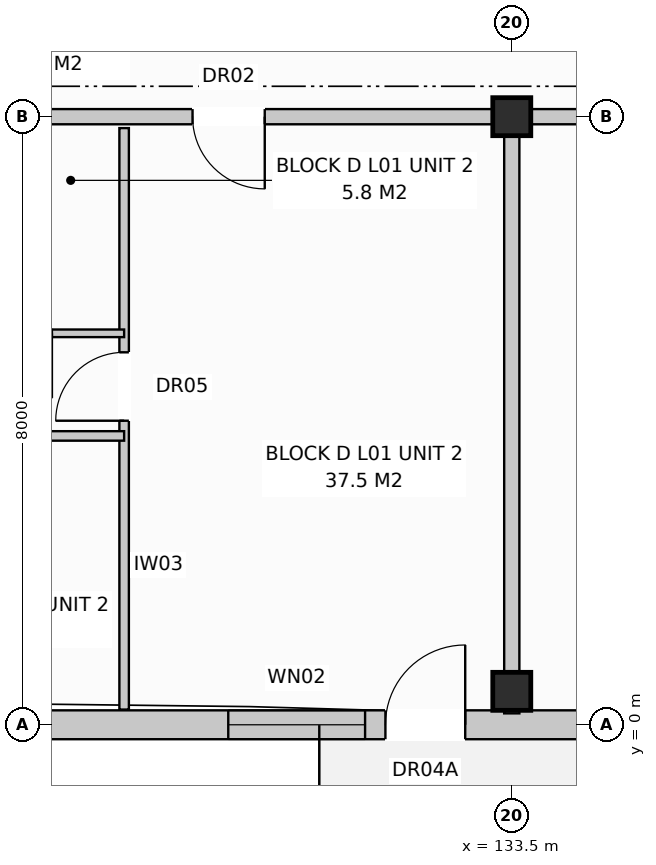
"""IFC4 building model, lengths in metres.
Left out: names, types, materials, properties, quantities, classifications, styles, units other than length and angle.
Written with IfcOpenShell. Run it as: python <this file> out.ifc"""

import sys

from ifc_helpers import new_model, si_unit, direction, frame, frame_2d, origin, origin_with_axes, origin_2d, place, context, subcontext, project, spatial, rectangle, extrude, element, fill, save


model = new_model("IFC4")
c1 = context("Model", 3, precision=1e-05, world=origin(), true_north=direction((0.0, 1.0)))
c2 = subcontext(c1, "Body", "Model", "MODEL_VIEW")
j1 = project(units=[si_unit("LENGTHUNIT", "METRE"), si_unit("PLANEANGLEUNIT", "RADIAN")], contexts=[c1])
p1 = place(None, origin())
s1 = spatial("IfcSite", under=j1, at=p1, CompositionType="ELEMENT")
p2 = place(p1, origin())
s2 = spatial("IfcBuilding", under=s1, at=p2, CompositionType="ELEMENT")
p3 = place(p2, frame((0.0, 0.0, 4.4)))
s3 = spatial("IfcBuildingStorey", under=s2, at=p3, CompositionType="ELEMENT", Elevation=4.4)
for number, where, z_axis, x_axis in (
    (1, (133.5, 0.44, 0.0), (0.0, 0.0, 1.0), (1.0, 0.0, 0.0)),
    (2, (133.5, 8.0, 0.0), (0.0, 0.0, 1.0), (1.0, 0.0, 0.0)),
):
    element("IfcColumn", number, at=place(p3, frame(where, z_axis=z_axis, x_axis=x_axis)), inside=s3, PredefinedType="COLUMN", context=c2, shape_type="SweptSolid", body=[
        extrude(rectangle(XDim=0.5, YDim=0.5, at=origin_2d()), origin(), (0.0, 0.0, 1.0), 3.6),
    ])
p4 = place(p3, frame((112.98, 0.0, 0.0), z_axis=(0.0, 0.0, 1.0), x_axis=(1.0, 0.0, 0.0)))
e3 = element("IfcWall", 3, at=p4, inside=s3, PredefinedType="STANDARD", context=c2, shape_type="SweptSolid", body=[
    extrude(rectangle(XDim=54.84, YDim=0.38, at=frame_2d((27.42, 0.0))), origin(), (0.0, 0.0, 1.0), 3.33),
])
p5 = place(p4, frame((5.04, 0.0, 0.0)))
e4 = element("IfcOpeningElement", 4, at=p5, cuts=e3, PredefinedType="OPENING", context=c2, shape_type="SweptSolid", body=[
    extrude(rectangle(XDim=1.05, YDim=2.12, at=frame_2d((0.525, 1.06))), frame((0.0, 0.202, 0.0), z_axis=(0.0, -1.0, 0.0), x_axis=(1.0, 0.0, 0.0)), (0.0, 0.0, 1.0), 0.404),
])
p6 = place(p4, frame((18.857, 0.0, 0.0)))
e5 = element("IfcOpeningElement", 5, at=p6, cuts=e3, PredefinedType="OPENING", context=c2, shape_type="SweptSolid", body=[
    extrude(rectangle(XDim=1.05, YDim=2.12, at=frame_2d((0.525, 1.06))), frame((0.0, 0.202, 0.0), z_axis=(0.0, -1.0, 0.0), x_axis=(1.0, 0.0, 0.0)), (0.0, 0.0, 1.0), 0.404),
])
p7 = place(p4, frame((32.657, 0.0, 0.0)))
e6 = element("IfcOpeningElement", 6, at=p7, cuts=e3, PredefinedType="OPENING", context=c2, shape_type="SweptSolid", body=[
    extrude(rectangle(XDim=1.05, YDim=2.12, at=frame_2d((0.525, 1.06))), frame((0.0, 0.202, 0.0), z_axis=(0.0, -1.0, 0.0), x_axis=(1.0, 0.0, 0.0)), (0.0, 0.0, 1.0), 0.404),
])
p8 = place(p4, frame((48.74, 0.0, 0.0)))
e7 = element("IfcOpeningElement", 7, at=p8, cuts=e3, PredefinedType="OPENING", context=c2, shape_type="SweptSolid", body=[
    extrude(rectangle(XDim=1.05, YDim=2.12, at=frame_2d((0.525, 1.06))), frame((0.0, 0.202, 0.0), z_axis=(0.0, -1.0, 0.0), x_axis=(1.0, 0.0, 0.0)), (0.0, 0.0, 1.0), 0.404),
])
p9 = place(p4, frame((0.89, 0.0, 0.8)))
e8 = element("IfcOpeningElement", 8, at=p9, cuts=e3, PredefinedType="OPENING", context=c2, shape_type="SweptSolid", body=[
    extrude(rectangle(XDim=1.8, YDim=1.7, at=frame_2d((0.9, 0.85))), frame((0.0, 0.202, 0.0), z_axis=(0.0, -1.0, 0.0), x_axis=(1.0, 0.0, 0.0)), (0.0, 0.0, 1.0), 0.404),
])
p10 = place(p4, frame((7.94, 0.0, 0.8)))
e9 = element("IfcOpeningElement", 9, at=p10, cuts=e3, PredefinedType="OPENING", context=c2, shape_type="SweptSolid", body=[
    extrude(rectangle(XDim=1.9, YDim=1.85, at=frame_2d((0.95, 0.925))), frame((0.0, 0.202, 0.0), z_axis=(0.0, -1.0, 0.0), x_axis=(1.0, 0.0, 0.0)), (0.0, 0.0, 1.0), 0.404),
])
p11 = place(p4, frame((11.215, 0.0, 0.8)))
e10 = element("IfcOpeningElement", 10, at=p11, cuts=e3, PredefinedType="OPENING", context=c2, shape_type="SweptSolid", body=[
    extrude(rectangle(XDim=1.95, YDim=1.65, at=frame_2d((0.975, 0.825))), frame((0.0, 0.202, 0.0), z_axis=(0.0, -1.0, 0.0), x_axis=(1.0, 0.0, 0.0)), (0.0, 0.0, 1.0), 0.404),
])
p12 = place(p4, frame((16.79, 0.0, 0.8)))
e11 = element("IfcOpeningElement", 11, at=p12, cuts=e3, PredefinedType="OPENING", context=c2, shape_type="SweptSolid", body=[
    extrude(rectangle(XDim=1.8, YDim=1.7, at=frame_2d((0.9, 0.85))), frame((0.0, 0.202, 0.0), z_axis=(0.0, -1.0, 0.0), x_axis=(1.0, 0.0, 0.0)), (0.0, 0.0, 1.0), 0.404),
])
p13 = place(p4, frame((22.24, 0.0, 0.8)))
e12 = element("IfcOpeningElement", 12, at=p13, cuts=e3, PredefinedType="OPENING", context=c2, shape_type="SweptSolid", body=[
    extrude(rectangle(XDim=1.9, YDim=1.85, at=frame_2d((0.95, 0.925))), frame((0.0, 0.202, 0.0), z_axis=(0.0, -1.0, 0.0), x_axis=(1.0, 0.0, 0.0)), (0.0, 0.0, 1.0), 0.404),
])
p14 = place(p4, frame((27.873, 0.0, 0.8)))
e13 = element("IfcOpeningElement", 13, at=p14, cuts=e3, PredefinedType="OPENING", context=c2, shape_type="SweptSolid", body=[
    extrude(rectangle(XDim=1.95, YDim=1.65, at=frame_2d((0.975, 0.825))), frame((0.0, 0.202, 0.0), z_axis=(0.0, -1.0, 0.0), x_axis=(1.0, 0.0, 0.0)), (0.0, 0.0, 1.0), 0.404),
])
p15 = place(p4, frame((30.59, 0.0, 0.8)))
e14 = element("IfcOpeningElement", 14, at=p15, cuts=e3, PredefinedType="OPENING", context=c2, shape_type="SweptSolid", body=[
    extrude(rectangle(XDim=1.8, YDim=1.7, at=frame_2d((0.9, 0.85))), frame((0.0, 0.202, 0.0), z_axis=(0.0, -1.0, 0.0), x_axis=(1.0, 0.0, 0.0)), (0.0, 0.0, 1.0), 0.404),
])
p16 = place(p4, frame((36.54, 0.0, 0.8)))
e15 = element("IfcOpeningElement", 15, at=p16, cuts=e3, PredefinedType="OPENING", context=c2, shape_type="SweptSolid", body=[
    extrude(rectangle(XDim=1.9, YDim=1.85, at=frame_2d((0.95, 0.925))), frame((0.0, 0.202, 0.0), z_axis=(0.0, -1.0, 0.0), x_axis=(1.0, 0.0, 0.0)), (0.0, 0.0, 1.0), 0.404),
])
p17 = place(p4, frame((42.215, 0.0, 0.8)))
e16 = element("IfcOpeningElement", 16, at=p17, cuts=e3, PredefinedType="OPENING", context=c2, shape_type="SweptSolid", body=[
    extrude(rectangle(XDim=1.95, YDim=1.65, at=frame_2d((0.975, 0.825))), frame((0.0, 0.202, 0.0), z_axis=(0.0, -1.0, 0.0), x_axis=(1.0, 0.0, 0.0)), (0.0, 0.0, 1.0), 0.404),
])
p18 = place(p4, frame((46.04, 0.0, 0.85)))
e17 = element("IfcOpeningElement", 17, at=p18, cuts=e3, PredefinedType="OPENING", context=c2, shape_type="SweptSolid", body=[
    extrude(rectangle(XDim=1.6, YDim=1.85, at=frame_2d((0.8, 0.925))), frame((0.0, 0.202, 0.0), z_axis=(0.0, -1.0, 0.0), x_axis=(1.0, 0.0, 0.0)), (0.0, 0.0, 1.0), 0.404),
])
p19 = place(p4, frame((52.04, 0.0, 0.8)))
e18 = element("IfcOpeningElement", 18, at=p19, cuts=e3, PredefinedType="OPENING", context=c2, shape_type="SweptSolid", body=[
    extrude(rectangle(XDim=1.9, YDim=1.85, at=frame_2d((0.95, 0.925))), frame((0.0, 0.202, 0.0), z_axis=(0.0, -1.0, 0.0), x_axis=(1.0, 0.0, 0.0)), (0.0, 0.0, 1.0), 0.404),
])
p20 = place(p3, frame((133.5, 7.85, 0.0), z_axis=(0.0, 0.0, 1.0), x_axis=(0.0, -1.0, 0.0)))
e19 = element("IfcWall", 19, at=p20, inside=s3, PredefinedType="PARTITIONING", context=c2, shape_type="SweptSolid", body=[
    extrude(rectangle(XDim=7.7, YDim=0.2, at=frame_2d((3.85, 0.0))), origin(), (0.0, 0.0, 1.0), 3.33),
])
p21 = place(p3, frame((119.7, 8.0, 0.0), z_axis=(0.0, 0.0, 1.0), x_axis=(1.0, 0.0, 0.0)))
e20 = element("IfcWall", 20, at=p21, inside=s3, PredefinedType="PARTITIONING", context=c2, shape_type="SweptSolid", body=[
    extrude(rectangle(XDim=13.8, YDim=0.2, at=frame_2d((6.9, 0.0))), origin(), (0.0, 0.0, 1.0), 2.77),
])
p22 = place(p21, frame((9.6, 0.0, 0.0)))
e21 = element("IfcOpeningElement", 21, at=p22, cuts=e20, PredefinedType="OPENING", context=c2, shape_type="SweptSolid", body=[
    extrude(rectangle(XDim=0.95, YDim=2.15, at=frame_2d((0.475, 1.075))), frame((0.0, 0.112, 0.0), z_axis=(0.0, -1.0, 0.0), x_axis=(1.0, 0.0, 0.0)), (0.0, 0.0, 1.0), 0.224),
])
p23 = place(p3, frame((128.4, 7.85, 0.0), z_axis=(0.0, 0.0, 1.0), x_axis=(0.0, -1.0, 0.0)))
e22 = element("IfcWall", 22, at=p23, inside=s3, PredefinedType="PARTITIONING", context=c2, shape_type="SweptSolid", body=[
    extrude(rectangle(XDim=7.65, YDim=0.125, at=frame_2d((3.825, 0.0))), origin(), (0.0, 0.0, 1.0), 3.33),
])
p24 = place(p23, frame((2.95, 0.0, 0.0)))
e23 = element("IfcOpeningElement", 23, at=p24, cuts=e22, PredefinedType="OPENING", context=c2, shape_type="SweptSolid", body=[
    extrude(rectangle(XDim=0.9, YDim=2.1, at=frame_2d((0.45, 1.05))), frame((0.0, 0.074, 0.0), z_axis=(0.0, -1.0, 0.0), x_axis=(1.0, 0.0, 0.0)), (0.0, 0.0, 1.0), 0.149),
])
p25 = place(p3, frame((119.8, 5.15, 0.0), z_axis=(0.0, 0.0, 1.0), x_axis=(1.0, 0.0, 0.0)))
e24 = element("IfcWall", 24, at=p25, inside=s3, PredefinedType="PARTITIONING", context=c2, shape_type="SweptSolid", body=[
    extrude(rectangle(XDim=8.6, YDim=0.1, at=frame_2d((4.3, 0.0))), origin(), (0.0, 0.0, 1.0), 3.33),
])
p26 = place(p25, frame((1.4, 0.0, 0.0)))
e25 = element("IfcOpeningElement", 25, at=p26, cuts=e24, PredefinedType="OPENING", context=c2, shape_type="SweptSolid", body=[
    extrude(rectangle(XDim=0.85, YDim=2.05, at=frame_2d((0.425, 1.025))), frame((0.0, 0.062, 0.0), z_axis=(0.0, -1.0, 0.0), x_axis=(1.0, 0.0, 0.0)), (0.0, 0.0, 1.0), 0.124),
])
p27 = place(p25, frame((4.65, 0.0, 0.0)))
e26 = element("IfcOpeningElement", 26, at=p27, cuts=e24, PredefinedType="OPENING", context=c2, shape_type="SweptSolid", body=[
    extrude(rectangle(XDim=0.85, YDim=2.05, at=frame_2d((0.425, 1.025))), frame((0.0, 0.062, 0.0), z_axis=(0.0, -1.0, 0.0), x_axis=(1.0, 0.0, 0.0)), (0.0, 0.0, 1.0), 0.124),
])
p28 = place(p25, frame((6.8, 0.0, 0.0)))
e27 = element("IfcOpeningElement", 27, at=p28, cuts=e24, PredefinedType="OPENING", context=c2, shape_type="SweptSolid", body=[
    extrude(rectangle(XDim=0.85, YDim=2.1, at=frame_2d((0.425, 1.05))), frame((0.0, 0.062, 0.0), z_axis=(0.0, -1.0, 0.0), x_axis=(1.0, 0.0, 0.0)), (0.0, 0.0, 1.0), 0.124),
])
p29 = place(p3, frame((123.9, 3.8, 0.0), z_axis=(0.0, 0.0, 1.0), x_axis=(1.0, 0.0, 0.0)))
e28 = element("IfcWall", 28, at=p29, inside=s3, PredefinedType="PARTITIONING", context=c2, shape_type="SweptSolid", body=[
    extrude(rectangle(XDim=4.5, YDim=0.125, at=frame_2d((2.25, 0.0))), origin(), (0.0, 0.0, 1.0), 3.33),
])
p30 = place(p29, frame((1.6, 0.0, 0.0)))
e29 = element("IfcOpeningElement", 29, at=p30, cuts=e28, PredefinedType="OPENING", context=c2, shape_type="SweptSolid", body=[
    extrude(rectangle(XDim=0.9, YDim=2.1, at=frame_2d((0.45, 1.05))), frame((0.0, 0.074, 0.0), z_axis=(0.0, -1.0, 0.0), x_axis=(1.0, 0.0, 0.0)), (0.0, 0.0, 1.0), 0.149),
])
p31 = place(p3, frame((133.5, 8.0, 0.0), z_axis=(0.0, 0.0, 1.0), x_axis=(1.0, 0.0, 0.0)))
e30 = element("IfcWall", 30, at=p31, inside=s3, PredefinedType="PARTITIONING", context=c2, shape_type="SweptSolid", body=[
    extrude(rectangle(XDim=13.8, YDim=0.2, at=frame_2d((6.9, 0.0))), origin(), (0.0, 0.0, 1.0), 2.77),
])
p32 = place(p31, frame((2.4, 0.0, 0.0)))
e31 = element("IfcOpeningElement", 31, at=p32, cuts=e30, PredefinedType="OPENING", context=c2, shape_type="SweptSolid", body=[
    extrude(rectangle(XDim=0.95, YDim=2.15, at=frame_2d((0.475, 1.075))), frame((0.0, 0.112, 0.0), z_axis=(0.0, -1.0, 0.0), x_axis=(1.0, 0.0, 0.0)), (0.0, 0.0, 1.0), 0.224),
])
p33 = place(p6, origin_with_axes())
e32 = element("IfcDoor", 32, at=p33, inside=s3, OperationType="SINGLE_SWING_RIGHT", PredefinedType="DOOR", context=c2, shape_type="SweptSolid", body=[
    extrude(rectangle(XDim=1.05, YDim=2.12, at=frame_2d((0.525, 1.06))), frame((0.0, 0.025, 0.0), z_axis=(0.0, -1.0, 0.0), x_axis=(1.0, 0.0, 0.0)), (0.0, 0.0, 1.0), 0.05),
])
fill(e5, e32)
p34 = place(p12, origin_with_axes())
e33 = element("IfcWindow", 33, at=p34, inside=s3, PartitioningType="SINGLE_PANEL", PredefinedType="WINDOW", context=c2, shape_type="SweptSolid", body=[
    extrude(rectangle(XDim=1.8, YDim=1.7, at=frame_2d((0.9, 0.85))), frame((0.0, 0.03, 0.0), z_axis=(0.0, -1.0, 0.0), x_axis=(1.0, 0.0, 0.0)), (0.0, 0.0, 1.0), 0.06),
])
fill(e11, e33)
p35 = place(p22, frame((0.95, 0.0, 0.0), z_axis=(0.0, 0.0, 1.0), x_axis=(-1.0, 0.0, 0.0)))
e34 = element("IfcDoor", 34, at=p35, inside=s3, OperationType="SINGLE_SWING_RIGHT", PredefinedType="DOOR", context=c2, shape_type="SweptSolid", body=[
    extrude(rectangle(XDim=0.95, YDim=2.15, at=frame_2d((0.475, 1.075))), frame((0.0, 0.025, 0.0), z_axis=(0.0, -1.0, 0.0), x_axis=(1.0, 0.0, 0.0)), (0.0, 0.0, 1.0), 0.05),
])
fill(e21, e34)
p36 = place(p24, frame((0.9, 0.0, 0.0), z_axis=(0.0, 0.0, 1.0), x_axis=(-1.0, 0.0, 0.0)))
e35 = element("IfcDoor", 35, at=p36, inside=s3, OperationType="SINGLE_SWING_RIGHT", PredefinedType="DOOR", context=c2, shape_type="SweptSolid", body=[
    extrude(rectangle(XDim=0.9, YDim=2.1, at=frame_2d((0.45, 1.05))), frame((0.0, 0.025, 0.0), z_axis=(0.0, -1.0, 0.0), x_axis=(1.0, 0.0, 0.0)), (0.0, 0.0, 1.0), 0.05),
])
fill(e23, e35)
p37 = place(p28, frame((0.85, 0.0, 0.0), z_axis=(0.0, 0.0, 1.0), x_axis=(-1.0, 0.0, 0.0)))
e36 = element("IfcDoor", 36, at=p37, inside=s3, OperationType="SINGLE_SWING_RIGHT", PredefinedType="DOOR", context=c2, shape_type="SweptSolid", body=[
    extrude(rectangle(XDim=0.85, YDim=2.1, at=frame_2d((0.425, 1.05))), frame((0.0, 0.025, 0.0), z_axis=(0.0, -1.0, 0.0), x_axis=(1.0, 0.0, 0.0)), (0.0, 0.0, 1.0), 0.05),
])
fill(e27, e36)
save(model, sys.argv[1])
